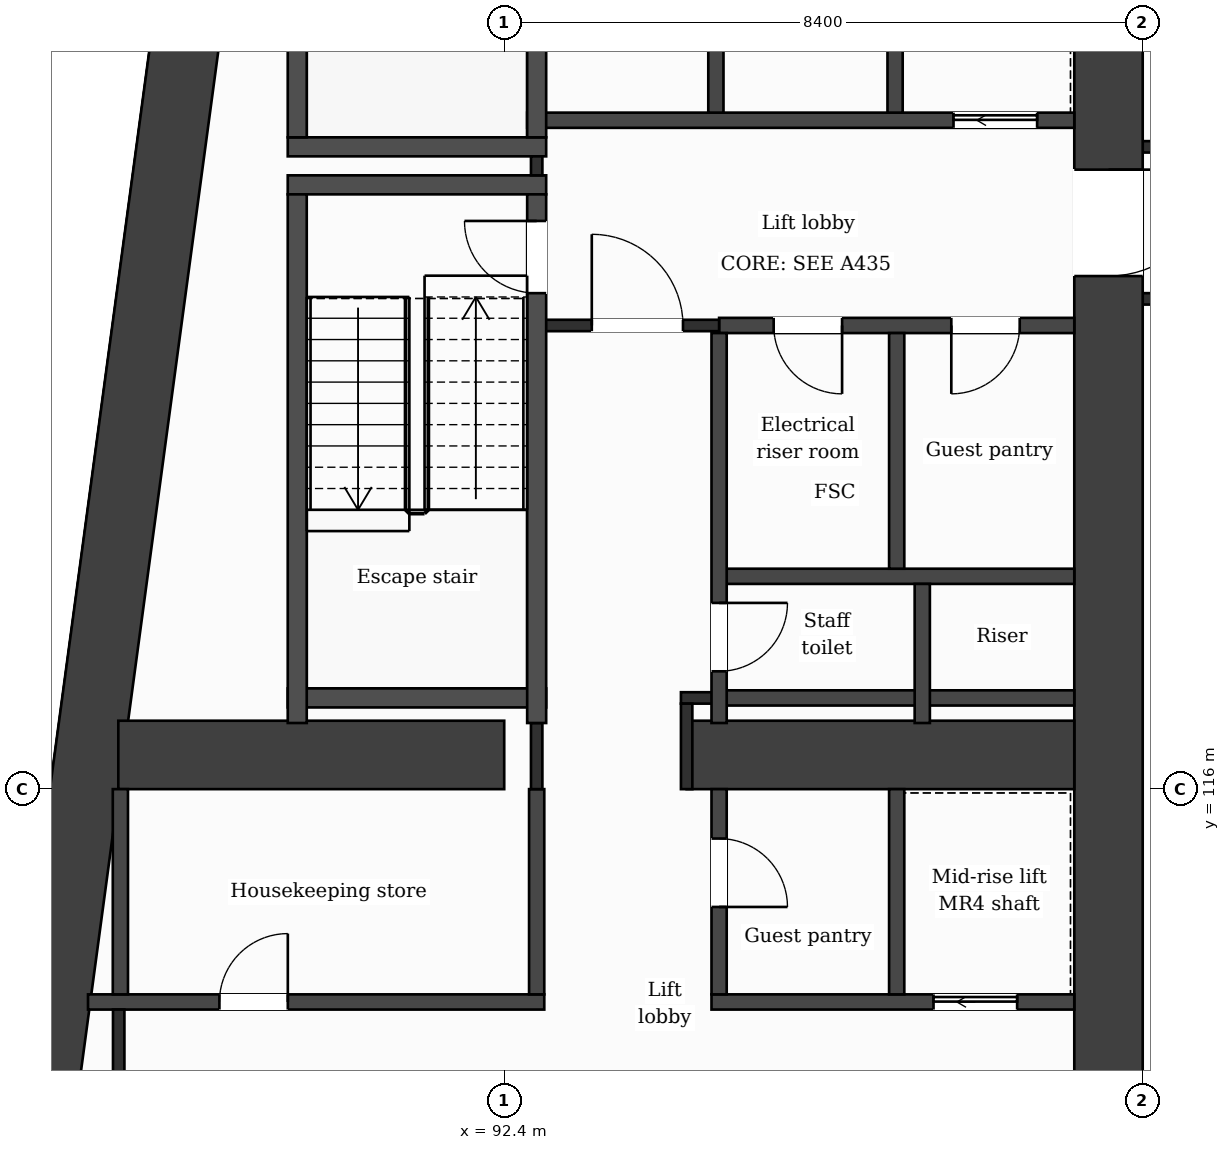
"""IFC4 building model, lengths in metres.
Left out: names, types, materials, properties, quantities, classifications, styles, units other than length and angle.
Written with IfcOpenShell. Run it as: python <this file> out.ifc"""

import sys

from ifc_helpers import new_model, si_unit, direction, frame, frame_2d, origin, place, context, subcontext, project, spatial, rectangle, extrude, element, fill, save


model = new_model("IFC4")
c1 = context("Model", 3, precision=1e-05, world=origin(), true_north=direction((0.0, 1.0)))
c2 = subcontext(c1, "Body", "Model", "MODEL_VIEW")
j1 = project(units=[si_unit("LENGTHUNIT", "METRE"), si_unit("PLANEANGLEUNIT", "RADIAN")], contexts=[c1])
p1 = place(None, origin())
s1 = spatial("IfcSite", under=j1, at=p1, CompositionType="ELEMENT")
p2 = place(p1, origin())
s2 = spatial("IfcBuilding", under=s1, at=p2, CompositionType="ELEMENT")
p3 = place(p2, frame((0.0, 0.0, 147.8)))
s3 = spatial("IfcBuildingStorey", under=s2, at=p3, CompositionType="ELEMENT", Elevation=147.8)
p4 = place(p3, frame((100.35, 131.95, 0.0), z_axis=(0.0, 0.0, 1.0), x_axis=(0.0, -1.0, 0.0)))
e1 = element("IfcWall", 1, at=p4, inside=s3, PredefinedType="SHEAR", context=c2, shape_type="SweptSolid", body=[
    extrude(rectangle(XDim=21.1, YDim=0.9, at=frame_2d((10.55, 0.0))), origin(), (0.0, 0.0, 1.0), 3.7),
])
p5 = place(p4, frame((7.8, 0.0, 0.0)))
e2 = element("IfcOpeningElement", 2, at=p5, cuts=e1, PredefinedType="OPENING", context=c2, shape_type="SweptSolid", body=[
    extrude(rectangle(XDim=1.4, YDim=2.1, at=frame_2d((0.7, 1.05))), frame((0.0, 0.46, 0.0), z_axis=(0.0, -1.0, 0.0), x_axis=(1.0, 0.0, 0.0)), (0.0, 0.0, 1.0), 0.92),
])
p6 = place(p3, frame((86.184, 110.85, 0.0), z_axis=(0.0, 0.0, 1.0), x_axis=(0.133410495943, 0.991060865725, 0.0)))
e3 = element("IfcWall", 3, at=p6, inside=s3, PredefinedType="SHEAR", context=c2, shape_type="SweptSolid", body=[
    extrude(rectangle(XDim=21.29, YDim=0.9, at=frame_2d((10.645, 0.0))), origin(), (0.0, 0.0, 1.0), 3.7),
])
p7 = place(p3, frame((87.323, 116.45, 0.0), z_axis=(0.0, 0.0, 1.0), x_axis=(1.0, 0.0, 0.0)))
e4 = element("IfcWall", 4, at=p7, inside=s3, PredefinedType="SHEAR", context=c2, shape_type="SweptSolid", body=[
    extrude(rectangle(XDim=5.077, YDim=0.9, at=frame_2d((2.539, 0.0))), origin(), (0.0, 0.0, 1.0), 3.7),
])
p8 = place(p3, frame((94.8, 116.45, 0.0), z_axis=(0.0, 0.0, 1.0), x_axis=(1.0, 0.0, 0.0)))
e5 = element("IfcWall", 5, at=p8, inside=s3, PredefinedType="SHEAR", context=c2, shape_type="SweptSolid", body=[
    extrude(rectangle(XDim=5.1, YDim=0.9, at=frame_2d((2.55, 0.0))), origin(), (0.0, 0.0, 1.0), 3.7),
])
p9 = place(p3, frame((86.924, 113.2, 0.0), z_axis=(0.0, 0.0, 1.0), x_axis=(1.0, 0.0, 0.0)))
e6 = element("IfcWall", 6, at=p9, inside=s3, PredefinedType="PARTITIONING", context=c2, shape_type="SweptSolid", body=[
    extrude(rectangle(XDim=6.003, YDim=0.2, at=frame_2d((3.001, 0.0))), origin(), (0.0, 0.0, 1.0), 3.38),
])
p10 = place(p9, frame((1.729, 0.0, 0.0)))
e7 = element("IfcOpeningElement", 7, at=p10, cuts=e6, PredefinedType="OPENING", context=c2, shape_type="SweptSolid", body=[
    extrude(rectangle(XDim=0.9, YDim=2.1, at=frame_2d((0.45, 1.05))), frame((0.0, 0.11, 0.0), z_axis=(0.0, -1.0, 0.0), x_axis=(1.0, 0.0, 0.0)), (0.0, 0.0, 1.0), 0.22),
])
p11 = place(p3, frame((95.127, 113.2, 0.0), z_axis=(0.0, 0.0, 1.0), x_axis=(1.0, 0.0, 0.0)))
e8 = element("IfcWall", 8, at=p11, inside=s3, PredefinedType="PARTITIONING", context=c2, shape_type="SweptSolid", body=[
    extrude(rectangle(XDim=4.773, YDim=0.2, at=frame_2d((2.386, 0.0))), origin(), (0.0, 0.0, 1.0), 3.38),
])
p12 = place(p11, frame((2.921, 0.0, 0.0)))
e9 = element("IfcOpeningElement", 9, at=p12, cuts=e8, PredefinedType="OPENING", context=c2, shape_type="SweptSolid", body=[
    extrude(rectangle(XDim=1.1, YDim=2.1, at=frame_2d((0.55, 1.05))), frame((0.0, 0.11, 0.0), z_axis=(0.0, -1.0, 0.0), x_axis=(1.0, 0.0, 0.0)), (0.0, 0.0, 1.0), 0.22),
])
p13 = place(p3, frame((95.227, 117.2, 0.0), z_axis=(0.0, 0.0, 1.0), x_axis=(1.0, 0.0, 0.0)))
e10 = element("IfcWall", 10, at=p13, inside=s3, PredefinedType="PARTITIONING", context=c2, shape_type="SweptSolid", body=[
    extrude(rectangle(XDim=4.673, YDim=0.2, at=frame_2d((2.336, 0.0))), origin(), (0.0, 0.0, 1.0), 3.38),
])
p14 = place(p3, frame((94.725, 117.2, 0.0), z_axis=(0.0, 0.0, 1.0), x_axis=(1.0, 0.0, 0.0)))
e11 = element("IfcWall", 11, at=p14, inside=s3, PredefinedType="PARTITIONING", context=c2, shape_type="SweptSolid", body=[
    extrude(rectangle(XDim=0.502, YDim=0.15, at=frame_2d((0.251, 0.0))), origin(), (0.0, 0.0, 1.0), 3.38),
])
p15 = place(p3, frame((89.552, 117.2, 0.0), z_axis=(0.0, 0.0, 1.0), x_axis=(1.0, 0.0, 0.0)))
e12 = element("IfcWall", 12, at=p15, inside=s3, PredefinedType="PARTITIONING", context=c2, shape_type="SweptSolid", body=[
    extrude(rectangle(XDim=3.4, YDim=0.25, at=frame_2d((1.7, 0.0))), origin(), (0.0, 0.0, 1.0), 3.38),
])
p16 = place(p3, frame((95.227, 118.8, 0.0), z_axis=(0.0, 0.0, 1.0), x_axis=(1.0, 0.0, 0.0)))
e13 = element("IfcWall", 13, at=p16, inside=s3, PredefinedType="PARTITIONING", context=c2, shape_type="SweptSolid", body=[
    extrude(rectangle(XDim=4.673, YDim=0.2, at=frame_2d((2.336, 0.0))), origin(), (0.0, 0.0, 1.0), 3.38),
])
p17 = place(p3, frame((95.227, 122.1, 0.0), z_axis=(0.0, 0.0, 1.0), x_axis=(1.0, 0.0, 0.0)))
e14 = element("IfcWall", 14, at=p17, inside=s3, PredefinedType="PARTITIONING", context=c2, shape_type="SweptSolid", body=[
    extrude(rectangle(XDim=4.673, YDim=0.2, at=frame_2d((2.336, 0.0))), origin(), (0.0, 0.0, 1.0), 3.38),
])
p18 = place(p17, frame((0.718, 0.0, 0.0)))
e15 = element("IfcOpeningElement", 15, at=p18, cuts=e14, PredefinedType="OPENING", context=c2, shape_type="SweptSolid", body=[
    extrude(rectangle(XDim=0.9, YDim=2.1, at=frame_2d((0.45, 1.05))), frame((0.0, 0.11, 0.0), z_axis=(0.0, -1.0, 0.0), x_axis=(1.0, 0.0, 0.0)), (0.0, 0.0, 1.0), 0.22),
])
p19 = place(p17, frame((3.055, 0.0, 0.0)))
e16 = element("IfcOpeningElement", 16, at=p19, cuts=e14, PredefinedType="OPENING", context=c2, shape_type="SweptSolid", body=[
    extrude(rectangle(XDim=0.9, YDim=2.1, at=frame_2d((0.45, 1.05))), frame((0.0, 0.11, 0.0), z_axis=(0.0, -1.0, 0.0), x_axis=(1.0, 0.0, 0.0)), (0.0, 0.0, 1.0), 0.22),
])
p20 = place(p3, frame((92.827, 122.1, 0.0), z_axis=(0.0, 0.0, 1.0), x_axis=(1.0, 0.0, 0.0)))
e17 = element("IfcWall", 17, at=p20, inside=s3, PredefinedType="PARTITIONING", context=c2, shape_type="SweptSolid", body=[
    extrude(rectangle(XDim=2.4, YDim=0.15, at=frame_2d((1.2, 0.0))), origin(), (0.0, 0.0, 1.0), 3.38),
])
p21 = place(p20, frame((0.725, 0.0, 0.0)))
e18 = element("IfcOpeningElement", 18, at=p21, cuts=e17, PredefinedType="OPENING", context=c2, shape_type="SweptSolid", body=[
    extrude(rectangle(XDim=1.2, YDim=2.1, at=frame_2d((0.6, 1.05))), frame((0.0, 0.085, 0.0), z_axis=(0.0, -1.0, 0.0), x_axis=(1.0, 0.0, 0.0)), (0.0, 0.0, 1.0), 0.17),
])
p22 = place(p3, frame((100.8, 122.45, 0.0), z_axis=(0.0, 0.0, 1.0), x_axis=(1.0, 0.0, 0.0)))
e19 = element("IfcWall", 19, at=p22, inside=s3, PredefinedType="PARTITIONING", context=c2, shape_type="SweptSolid", body=[
    extrude(rectangle(XDim=25.2, YDim=0.15, at=frame_2d((12.6, 0.0))), origin(), (0.0, 0.0, 1.0), 3.38),
])
for number, where, z_axis, x_axis in (
    (20, (89.552, 123.95, 0.0), (0.0, 0.0, 1.0), (1.0, 0.0, 0.0)),
    (21, (89.552, 124.45, 0.0), (0.0, 0.0, 1.0), (1.0, 0.0, 0.0)),
):
    element("IfcWall", number, at=place(p3, frame(where, z_axis=z_axis, x_axis=x_axis)), inside=s3, PredefinedType="PARTITIONING", context=c2, shape_type="SweptSolid", body=[
        extrude(rectangle(XDim=3.4, YDim=0.25, at=frame_2d((1.7, 0.0))), origin(), (0.0, 0.0, 1.0), 3.38),
    ])
p23 = place(p3, frame((100.8, 124.45, 0.0), z_axis=(0.0, 0.0, 1.0), x_axis=(1.0, 0.0, 0.0)))
e22 = element("IfcWall", 22, at=p23, inside=s3, PredefinedType="PARTITIONING", context=c2, shape_type="SweptSolid", body=[
    extrude(rectangle(XDim=25.2, YDim=0.15, at=frame_2d((12.6, 0.0))), origin(), (0.0, 0.0, 1.0), 3.38),
])
p24 = place(p23, frame((3.03, 0.0, 0.0)))
e23 = element("IfcOpeningElement", 23, at=p24, cuts=e22, PredefinedType="OPENING", context=c2, shape_type="SweptSolid", body=[
    extrude(rectangle(XDim=1.0, YDim=2.1, at=frame_2d((0.5, 1.05))), frame((0.0, 0.085, 0.0), z_axis=(0.0, -1.0, 0.0), x_axis=(1.0, 0.0, 0.0)), (0.0, 0.0, 1.0), 0.17),
])
p25 = place(p23, frame((12.77, 0.0, 0.0)))
e24 = element("IfcOpeningElement", 24, at=p25, cuts=e22, PredefinedType="OPENING", context=c2, shape_type="SweptSolid", body=[
    extrude(rectangle(XDim=1.0, YDim=2.1, at=frame_2d((0.5, 1.05))), frame((0.0, 0.085, 0.0), z_axis=(0.0, -1.0, 0.0), x_axis=(1.0, 0.0, 0.0)), (0.0, 0.0, 1.0), 0.17),
])
p26 = place(p23, frame((17.67, 0.0, 0.0)))
e25 = element("IfcOpeningElement", 25, at=p26, cuts=e22, PredefinedType="OPENING", context=c2, shape_type="SweptSolid", body=[
    extrude(rectangle(XDim=1.0, YDim=2.1, at=frame_2d((0.5, 1.05))), frame((0.0, 0.085, 0.0), z_axis=(0.0, -1.0, 0.0), x_axis=(1.0, 0.0, 0.0)), (0.0, 0.0, 1.0), 0.17),
])
p27 = place(p23, frame((22.35, 0.0, 0.0)))
e26 = element("IfcOpeningElement", 26, at=p27, cuts=e22, PredefinedType="OPENING", context=c2, shape_type="SweptSolid", body=[
    extrude(rectangle(XDim=1.0, YDim=2.1, at=frame_2d((0.5, 1.05))), frame((0.0, 0.085, 0.0), z_axis=(0.0, -1.0, 0.0), x_axis=(1.0, 0.0, 0.0)), (0.0, 0.0, 1.0), 0.17),
])
p28 = place(p3, frame((92.702, 124.8, 0.0), z_axis=(0.0, 0.0, 1.0), x_axis=(1.0, 0.0, 0.0)))
e27 = element("IfcWall", 27, at=p28, inside=s3, PredefinedType="PARTITIONING", context=c2, shape_type="SweptSolid", body=[
    extrude(rectangle(XDim=7.198, YDim=0.2, at=frame_2d((3.599, 0.0))), origin(), (0.0, 0.0, 1.0), 3.38),
])
p29 = place(p28, frame((5.609, 0.0, 0.0)))
e28 = element("IfcOpeningElement", 28, at=p29, cuts=e27, PredefinedType="OPENING", context=c2, shape_type="SweptSolid", body=[
    extrude(rectangle(XDim=1.1, YDim=2.1, at=frame_2d((0.55, 1.05))), frame((0.0, 0.11, 0.0), z_axis=(0.0, -1.0, 0.0), x_axis=(1.0, 0.0, 0.0)), (0.0, 0.0, 1.0), 0.22),
])
p30 = place(p3, frame((87.35, 113.3, 0.0), z_axis=(0.0, 0.0, 1.0), x_axis=(0.0, 1.0, 0.0)))
e29 = element("IfcWall", 29, at=p30, inside=s3, PredefinedType="PARTITIONING", context=c2, shape_type="SweptSolid", body=[
    extrude(rectangle(XDim=2.7, YDim=0.2, at=frame_2d((1.35, 0.0))), origin(), (0.0, 0.0, 1.0), 3.38),
])
p31 = place(p3, frame((87.328, 111.3, 0.0), z_axis=(0.0, 0.0, 1.0), x_axis=(0.0, 1.0, 0.0)))
e30 = element("IfcWall", 30, at=p31, inside=s3, PredefinedType="PARTITIONING", context=c2, shape_type="SweptSolid", body=[
    extrude(rectangle(XDim=1.8, YDim=0.15, at=frame_2d((0.9, 0.0))), origin(), (0.0, 0.0, 1.0), 3.38),
])
p32 = place(p3, frame((89.677, 116.87, 0.0), z_axis=(0.0, 0.0, 1.0), x_axis=(0.0, 1.0, 0.0)))
e31 = element("IfcWall", 31, at=p32, inside=s3, PredefinedType="PARTITIONING", context=c2, shape_type="SweptSolid", body=[
    extrude(rectangle(XDim=6.955, YDim=0.25, at=frame_2d((3.478, 0.0))), origin(), (0.0, 0.0, 1.0), 3.38),
])
p33 = place(p3, frame((89.677, 124.575, 0.0), z_axis=(0.0, 0.0, 1.0), x_axis=(0.0, 1.0, 0.0)))
e32 = element("IfcWall", 32, at=p33, inside=s3, PredefinedType="PARTITIONING", context=c2, shape_type="SweptSolid", body=[
    extrude(rectangle(XDim=6.955, YDim=0.25, at=frame_2d((3.478, 0.0))), origin(), (0.0, 0.0, 1.0), 3.38),
])
p34 = place(p3, frame((92.827, 113.3, 0.0), z_axis=(0.0, 0.0, 1.0), x_axis=(0.0, 1.0, 0.0)))
e33 = element("IfcWall", 33, at=p34, inside=s3, PredefinedType="PARTITIONING", context=c2, shape_type="SweptSolid", body=[
    extrude(rectangle(XDim=2.7, YDim=0.2, at=frame_2d((1.35, 0.0))), origin(), (0.0, 0.0, 1.0), 3.38),
])
p35 = place(p3, frame((92.827, 116.0, 0.0), z_axis=(0.0, 0.0, 1.0), x_axis=(0.0, 1.0, 0.0)))
e34 = element("IfcWall", 34, at=p35, inside=s3, PredefinedType="PARTITIONING", context=c2, shape_type="SweptSolid", body=[
    extrude(rectangle(XDim=0.87, YDim=0.15, at=frame_2d((0.435, 0.0))), origin(), (0.0, 0.0, 1.0), 3.38),
])
p36 = place(p3, frame((92.827, 124.075, 0.0), z_axis=(0.0, 0.0, 1.0), x_axis=(0.0, 1.0, 0.0)))
e35 = element("IfcWall", 35, at=p36, inside=s3, PredefinedType="PARTITIONING", context=c2, shape_type="SweptSolid", body=[
    extrude(rectangle(XDim=0.25, YDim=0.15, at=frame_2d((0.125, 0.0))), origin(), (0.0, 0.0, 1.0), 3.38),
])
p37 = place(p3, frame((92.827, 116.87, 0.0), z_axis=(0.0, 0.0, 1.0), x_axis=(0.0, 1.0, 0.0)))
e36 = element("IfcWall", 36, at=p37, inside=s3, PredefinedType="PARTITIONING", context=c2, shape_type="SweptSolid", body=[
    extrude(rectangle(XDim=6.955, YDim=0.25, at=frame_2d((3.478, 0.0))), origin(), (0.0, 0.0, 1.0), 3.38),
])
p38 = place(p37, frame((5.655, 0.0, 0.0)))
e37 = element("IfcOpeningElement", 37, at=p38, cuts=e36, PredefinedType="OPENING", context=c2, shape_type="SweptSolid", body=[
    extrude(rectangle(XDim=0.95, YDim=2.1, at=frame_2d((0.475, 1.05))), frame((0.0, 0.135, 0.0), z_axis=(0.0, -1.0, 0.0), x_axis=(1.0, 0.0, 0.0)), (0.0, 0.0, 1.0), 0.27),
])
p39 = place(p3, frame((92.827, 124.575, 0.0), z_axis=(0.0, 0.0, 1.0), x_axis=(0.0, 1.0, 0.0)))
e38 = element("IfcWall", 38, at=p39, inside=s3, PredefinedType="PARTITIONING", context=c2, shape_type="SweptSolid", body=[
    extrude(rectangle(XDim=6.955, YDim=0.25, at=frame_2d((3.478, 0.0))), origin(), (0.0, 0.0, 1.0), 3.38),
])
p40 = place(p39, frame((5.325, 0.0, 0.0)))
e39 = element("IfcOpeningElement", 39, at=p40, cuts=e38, PredefinedType="OPENING", context=c2, shape_type="SweptSolid", body=[
    extrude(rectangle(XDim=1.0, YDim=2.1, at=frame_2d((0.5, 1.05))), frame((0.0, 0.135, 0.0), z_axis=(0.0, -1.0, 0.0), x_axis=(1.0, 0.0, 0.0)), (0.0, 0.0, 1.0), 0.27),
])
p41 = place(p3, frame((94.8, 116.0, 0.0), z_axis=(0.0, 0.0, 1.0), x_axis=(0.0, 1.0, 0.0)))
e40 = element("IfcWall", 40, at=p41, inside=s3, PredefinedType="PARTITIONING", context=c2, shape_type="SweptSolid", body=[
    extrude(rectangle(XDim=1.125, YDim=0.15, at=frame_2d((0.562, 0.0))), origin(), (0.0, 0.0, 1.0), 3.38),
])
p42 = place(p3, frame((95.185, 124.9, 0.0), z_axis=(0.0, 0.0, 1.0), x_axis=(0.0, 1.0, 0.0)))
e41 = element("IfcWall", 41, at=p42, inside=s3, PredefinedType="PARTITIONING", context=c2, shape_type="SweptSolid", body=[
    extrude(rectangle(XDim=3.1, YDim=0.2, at=frame_2d((1.55, 0.0))), origin(), (0.0, 0.0, 1.0), 3.38),
])
p43 = place(p3, frame((95.227, 113.3, 0.0), z_axis=(0.0, 0.0, 1.0), x_axis=(0.0, 1.0, 0.0)))
e42 = element("IfcWall", 42, at=p43, inside=s3, PredefinedType="PARTITIONING", context=c2, shape_type="SweptSolid", body=[
    extrude(rectangle(XDim=2.7, YDim=0.2, at=frame_2d((1.35, 0.0))), origin(), (0.0, 0.0, 1.0), 3.38),
])
p44 = place(p43, frame((1.15, 0.0, 0.0)))
e43 = element("IfcOpeningElement", 43, at=p44, cuts=e42, PredefinedType="OPENING", context=c2, shape_type="SweptSolid", body=[
    extrude(rectangle(XDim=0.9, YDim=2.1, at=frame_2d((0.45, 1.05))), frame((0.0, 0.11, 0.0), z_axis=(0.0, -1.0, 0.0), x_axis=(1.0, 0.0, 0.0)), (0.0, 0.0, 1.0), 0.22),
])
p45 = place(p3, frame((95.227, 116.87, 0.0), z_axis=(0.0, 0.0, 1.0), x_axis=(0.0, 1.0, 0.0)))
e44 = element("IfcWall", 44, at=p45, inside=s3, PredefinedType="PARTITIONING", context=c2, shape_type="SweptSolid", body=[
    extrude(rectangle(XDim=5.13, YDim=0.2, at=frame_2d((2.565, 0.0))), origin(), (0.0, 0.0, 1.0), 3.38),
])
p46 = place(p45, frame((0.68, 0.0, 0.0)))
e45 = element("IfcOpeningElement", 45, at=p46, cuts=e44, PredefinedType="OPENING", context=c2, shape_type="SweptSolid", body=[
    extrude(rectangle(XDim=0.9, YDim=2.1, at=frame_2d((0.45, 1.05))), frame((0.0, 0.11, 0.0), z_axis=(0.0, -1.0, 0.0), x_axis=(1.0, 0.0, 0.0)), (0.0, 0.0, 1.0), 0.22),
])
p47 = place(p3, frame((97.542, 124.9, 0.0), z_axis=(0.0, 0.0, 1.0), x_axis=(0.0, 1.0, 0.0)))
e46 = element("IfcWall", 46, at=p47, inside=s3, PredefinedType="PARTITIONING", context=c2, shape_type="SweptSolid", body=[
    extrude(rectangle(XDim=3.1, YDim=0.2, at=frame_2d((1.55, 0.0))), origin(), (0.0, 0.0, 1.0), 3.38),
])
p48 = place(p3, frame((97.563, 113.3, 0.0), z_axis=(0.0, 0.0, 1.0), x_axis=(0.0, 1.0, 0.0)))
e47 = element("IfcWall", 47, at=p48, inside=s3, PredefinedType="PARTITIONING", context=c2, shape_type="SweptSolid", body=[
    extrude(rectangle(XDim=2.7, YDim=0.2, at=frame_2d((1.35, 0.0))), origin(), (0.0, 0.0, 1.0), 3.38),
])
p49 = place(p3, frame((97.563, 118.9, 0.0), z_axis=(0.0, 0.0, 1.0), x_axis=(0.0, 1.0, 0.0)))
e48 = element("IfcWall", 48, at=p49, inside=s3, PredefinedType="PARTITIONING", context=c2, shape_type="SweptSolid", body=[
    extrude(rectangle(XDim=3.1, YDim=0.2, at=frame_2d((1.55, 0.0))), origin(), (0.0, 0.0, 1.0), 3.38),
])
p50 = place(p3, frame((97.9, 116.87, 0.0), z_axis=(0.0, 0.0, 1.0), x_axis=(0.0, 1.0, 0.0)))
e49 = element("IfcWall", 49, at=p50, inside=s3, PredefinedType="PARTITIONING", context=c2, shape_type="SweptSolid", body=[
    extrude(rectangle(XDim=1.83, YDim=0.2, at=frame_2d((0.915, 0.0))), origin(), (0.0, 0.0, 1.0), 3.38),
])
p51 = place(p21, origin())
e50 = element("IfcDoor", 50, at=p51, inside=s3, OperationType="SINGLE_SWING_LEFT", PredefinedType="DOOR", context=c2, shape_type="SweptSolid", body=[
    extrude(rectangle(XDim=1.2, YDim=2.1, at=frame_2d((0.6, 1.05))), frame((0.0, 0.025, 0.0), z_axis=(0.0, -1.0, 0.0), x_axis=(1.0, 0.0, 0.0)), (0.0, 0.0, 1.0), 0.05),
])
fill(e18, e50)
p52 = place(p29, origin())
e51 = element("IfcDoor", 51, at=p52, inside=s3, OperationType="SLIDING_TO_LEFT", PredefinedType="DOOR", context=c2, shape_type="SweptSolid", body=[
    extrude(rectangle(XDim=1.1, YDim=2.1, at=frame_2d((0.55, 1.05))), frame((0.0, 0.025, 0.0), z_axis=(0.0, -1.0, 0.0), x_axis=(1.0, 0.0, 0.0)), (0.0, 0.0, 1.0), 0.05),
])
fill(e28, e51)
p53 = place(p18, origin())
e52 = element("IfcDoor", 52, at=p53, inside=s3, OperationType="SINGLE_SWING_RIGHT", PredefinedType="DOOR", context=c2, shape_type="SweptSolid", body=[
    extrude(rectangle(XDim=0.9, YDim=2.1, at=frame_2d((0.45, 1.05))), frame((0.0, 0.025, 0.0), z_axis=(0.0, -1.0, 0.0), x_axis=(1.0, 0.0, 0.0)), (0.0, 0.0, 1.0), 0.05),
])
fill(e15, e52)
p54 = place(p19, origin())
e53 = element("IfcDoor", 53, at=p54, inside=s3, OperationType="SINGLE_SWING_LEFT", PredefinedType="DOOR", context=c2, shape_type="SweptSolid", body=[
    extrude(rectangle(XDim=0.9, YDim=2.1, at=frame_2d((0.45, 1.05))), frame((0.0, 0.025, 0.0), z_axis=(0.0, -1.0, 0.0), x_axis=(1.0, 0.0, 0.0)), (0.0, 0.0, 1.0), 0.05),
])
fill(e16, e53)
p55 = place(p38, origin())
e54 = element("IfcDoor", 54, at=p55, inside=s3, OperationType="SINGLE_SWING_RIGHT", PredefinedType="DOOR", context=c2, shape_type="SweptSolid", body=[
    extrude(rectangle(XDim=0.95, YDim=2.1, at=frame_2d((0.475, 1.05))), frame((0.0, 0.025, 0.0), z_axis=(0.0, -1.0, 0.0), x_axis=(1.0, 0.0, 0.0)), (0.0, 0.0, 1.0), 0.05),
])
fill(e37, e54)
p56 = place(p46, origin())
e55 = element("IfcDoor", 55, at=p56, inside=s3, OperationType="SINGLE_SWING_RIGHT", PredefinedType="DOOR", context=c2, shape_type="SweptSolid", body=[
    extrude(rectangle(XDim=0.9, YDim=2.1, at=frame_2d((0.45, 1.05))), frame((0.0, 0.025, 0.0), z_axis=(0.0, -1.0, 0.0), x_axis=(1.0, 0.0, 0.0)), (0.0, 0.0, 1.0), 0.05),
])
fill(e45, e55)
p57 = place(p12, origin())
e56 = element("IfcDoor", 56, at=p57, inside=s3, OperationType="SLIDING_TO_LEFT", PredefinedType="DOOR", context=c2, shape_type="SweptSolid", body=[
    extrude(rectangle(XDim=1.1, YDim=2.1, at=frame_2d((0.55, 1.05))), frame((0.0, 0.025, 0.0), z_axis=(0.0, -1.0, 0.0), x_axis=(1.0, 0.0, 0.0)), (0.0, 0.0, 1.0), 0.05),
])
fill(e9, e56)
p58 = place(p10, origin())
e57 = element("IfcDoor", 57, at=p58, inside=s3, OperationType="SINGLE_SWING_RIGHT", PredefinedType="DOOR", context=c2, shape_type="SweptSolid", body=[
    extrude(rectangle(XDim=0.9, YDim=2.1, at=frame_2d((0.45, 1.05))), frame((0.0, 0.025, 0.0), z_axis=(0.0, -1.0, 0.0), x_axis=(1.0, 0.0, 0.0)), (0.0, 0.0, 1.0), 0.05),
])
fill(e7, e57)
p59 = place(p44, origin())
e58 = element("IfcDoor", 58, at=p59, inside=s3, OperationType="SINGLE_SWING_LEFT", PredefinedType="DOOR", context=c2, shape_type="SweptSolid", body=[
    extrude(rectangle(XDim=0.9, YDim=2.1, at=frame_2d((0.45, 1.05))), frame((0.0, 0.025, 0.0), z_axis=(0.0, -1.0, 0.0), x_axis=(1.0, 0.0, 0.0)), (0.0, 0.0, 1.0), 0.05),
])
fill(e43, e58)
p60 = place(p5, origin())
e59 = element("IfcDoor", 59, at=p60, inside=s3, OperationType="SINGLE_SWING_LEFT", PredefinedType="DOOR", context=c2, shape_type="SweptSolid", body=[
    extrude(rectangle(XDim=1.4, YDim=2.1, at=frame_2d((0.7, 1.05))), frame((0.0, 0.025, 0.0), z_axis=(0.0, -1.0, 0.0), x_axis=(1.0, 0.0, 0.0)), (0.0, 0.0, 1.0), 0.05),
])
fill(e2, e59)
save(model, sys.argv[1])
